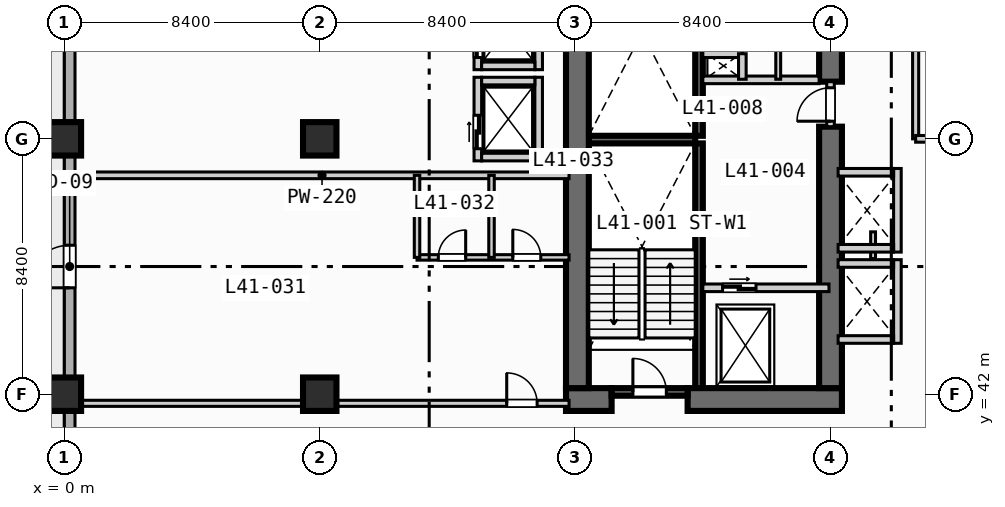
"""IFC4 building model, lengths in metres.
Left out: names, types, materials, properties, quantities, classifications, styles, units other than length and angle.
Written with IfcOpenShell. Run it as: python <this file> out.ifc"""

import sys

from ifc_helpers import new_model, si_unit, direction, frame, frame_2d, origin, origin_2d, place, context, subcontext, project, spatial, rectangle, extrude, element, fill, save


model = new_model("IFC4")
c1 = context("Model", 3, precision=1e-05, world=origin(), true_north=direction((0.0, 1.0)))
c2 = subcontext(c1, "Body", "Model", "MODEL_VIEW")
j1 = project(units=[si_unit("LENGTHUNIT", "METRE"), si_unit("PLANEANGLEUNIT", "RADIAN")], contexts=[c1])
p1 = place(None, origin())
s1 = spatial("IfcSite", under=j1, at=p1, CompositionType="ELEMENT")
p2 = place(p1, origin())
s2 = spatial("IfcBuilding", under=s1, at=p2, CompositionType="ELEMENT")
p3 = place(p2, frame((0.0, 0.0, 171.7)))
s3 = spatial("IfcBuildingStorey", under=s2, at=p3, CompositionType="ELEMENT", Elevation=171.7)
for number, where, z_axis, x_axis in (
    (1, (20.875, 42.2, 0.0), (0.0, 0.0, 1.0), (0.0, 1.0, 0.0)),
    (2, (20.875, 50.5, 0.0), (0.0, 0.0, 1.0), (0.0, 1.0, 0.0)),
):
    element("IfcWall", number, at=place(p3, frame(where, z_axis=z_axis, x_axis=x_axis)), inside=s3, PredefinedType="SOLIDWALL", context=c2, shape_type="SweptSolid", body=[
        extrude(rectangle(XDim=8.05, YDim=0.25, at=frame_2d((4.025, 0.0))), origin(), (0.0, 0.0, 1.0), 3.47),
    ])
p4 = place(p3, frame((17.25, 50.375, 0.0), z_axis=(0.0, 0.0, 1.0), x_axis=(1.0, 0.0, 0.0)))
e3 = element("IfcWall", 3, at=p4, inside=s3, PredefinedType="SOLIDWALL", context=c2, shape_type="SweptSolid", body=[
    extrude(rectangle(XDim=3.5, YDim=0.25, at=frame_2d((1.75, 0.0))), origin(), (0.0, 0.0, 1.0), 3.47),
])
p5 = place(p3, frame((16.5, 41.825, 0.0), z_axis=(0.0, 0.0, 1.0), x_axis=(1.0, 0.0, 0.0)))
e4 = element("IfcWall", 4, at=p5, inside=s3, PredefinedType="SHEAR", context=c2, shape_type="SweptSolid", body=[
    extrude(rectangle(XDim=1.5, YDim=0.75, at=frame_2d((0.75, 0.0))), origin(), (0.0, 0.0, 1.0), 3.47),
])
p6 = place(p3, frame((20.5, 41.825, 0.0), z_axis=(0.0, 0.0, 1.0), x_axis=(1.0, 0.0, 0.0)))
e5 = element("IfcWall", 5, at=p6, inside=s3, PredefinedType="SHEAR", context=c2, shape_type="SweptSolid", body=[
    extrude(rectangle(XDim=5.075, YDim=0.75, at=frame_2d((2.538, 0.0))), origin(), (0.0, 0.0, 1.0), 3.47),
])
p7 = place(p3, frame((16.875, 42.2, 0.0), z_axis=(0.0, 0.0, 1.0), x_axis=(0.0, 1.0, 0.0)))
e6 = element("IfcWall", 6, at=p7, inside=s3, PredefinedType="SHEAR", context=c2, shape_type="SweptSolid", body=[
    extrude(rectangle(XDim=16.35, YDim=0.75, at=frame_2d((8.175, 0.0))), origin(), (0.0, 0.0, 1.0), 3.47),
])
p8 = place(p3, frame((25.2, 42.2, 0.0), z_axis=(0.0, 0.0, 1.0), x_axis=(0.0, 1.0, 0.0)))
e7 = element("IfcWall", 7, at=p8, inside=s3, PredefinedType="SHEAR", context=c2, shape_type="SweptSolid", body=[
    extrude(rectangle(XDim=8.6, YDim=0.75, at=frame_2d((4.3, 0.0))), origin(), (0.0, 0.0, 1.0), 3.47),
])
p9 = place(p3, frame((25.2, 52.28, 0.0), z_axis=(0.0, 0.0, 1.0), x_axis=(0.0, 1.0, 0.0)))
e8 = element("IfcWall", 8, at=p9, inside=s3, PredefinedType="SHEAR", context=c2, shape_type="SweptSolid", body=[
    extrude(rectangle(XDim=1.27, YDim=0.75, at=frame_2d((0.635, 0.0))), origin(), (0.0, 0.0, 1.0), 3.47),
])
for number, where, z_axis, x_axis in (
    (9, (0.0, 42.0, 0.0), (0.0, 0.0, 1.0), (1.0, 0.0, 0.0)),
    (10, (0.0, 50.4, 0.0), (0.0, 0.0, 1.0), (1.0, 0.0, 0.0)),
    (11, (8.4, 42.0, 0.0), (0.0, 0.0, 1.0), (1.0, 0.0, 0.0)),
    (12, (8.4, 50.4, 0.0), (0.0, 0.0, 1.0), (1.0, 0.0, 0.0)),
):
    element("IfcColumn", number, at=place(p3, frame(where, z_axis=z_axis, x_axis=x_axis)), inside=s3, PredefinedType="COLUMN", context=c2, shape_type="SweptSolid", body=[
        extrude(rectangle(XDim=1.1, YDim=1.1, at=origin_2d()), origin(), (0.0, 0.0, 1.0), 3.7),
    ])
p10 = place(p3, frame((0.175, 3.175, 0.0), z_axis=(0.0, 0.0, 1.0), x_axis=(0.0, 1.0, 0.0)))
e13 = element("IfcWall", 13, at=p10, inside=s3, PredefinedType="STANDARD", context=c2, shape_type="SweptSolid", body=[
    extrude(rectangle(XDim=69.25, YDim=0.35, at=frame_2d((34.625, 0.0))), origin(), (0.0, 0.0, 1.0), 3.47),
])
p11 = place(p10, frame((42.325, 0.0, 0.0)))
e14 = element("IfcOpeningElement", 14, at=p11, cuts=e13, PredefinedType="OPENING", context=c2, shape_type="SweptSolid", body=[
    extrude(rectangle(XDim=1.4, YDim=2.2, at=frame_2d((0.7, 1.1))), frame((0.0, 0.185, 0.0), z_axis=(0.0, -1.0, 0.0), x_axis=(1.0, 0.0, 0.0)), (0.0, 0.0, 1.0), 0.37),
])
p12 = place(p10, frame((25.025, 0.0, 0.85)))
e15 = element("IfcOpeningElement", 15, at=p12, cuts=e13, PredefinedType="OPENING", context=c2, shape_type="SweptSolid", body=[
    extrude(rectangle(XDim=2.4, YDim=1.95, at=frame_2d((1.2, 0.975))), frame((0.0, 0.185, 0.0), z_axis=(0.0, -1.0, 0.0), x_axis=(1.0, 0.0, 0.0)), (0.0, 0.0, 1.0), 0.37),
])
p13 = place(p10, frame((33.725, 0.0, 0.85)))
e16 = element("IfcOpeningElement", 16, at=p13, cuts=e13, PredefinedType="OPENING", context=c2, shape_type="SweptSolid", body=[
    extrude(rectangle(XDim=1.8, YDim=1.8, at=frame_2d((0.9, 0.9))), frame((0.0, 0.185, 0.0), z_axis=(0.0, -1.0, 0.0), x_axis=(1.0, 0.0, 0.0)), (0.0, 0.0, 1.0), 0.37),
])
p14 = place(p10, frame((58.625, 0.0, 0.85)))
e17 = element("IfcOpeningElement", 17, at=p14, cuts=e13, PredefinedType="OPENING", context=c2, shape_type="SweptSolid", body=[
    extrude(rectangle(XDim=2.4, YDim=1.95, at=frame_2d((1.2, 0.975))), frame((0.0, 0.185, 0.0), z_axis=(0.0, -1.0, 0.0), x_axis=(1.0, 0.0, 0.0)), (0.0, 0.0, 1.0), 0.37),
])
p15 = place(p3, frame((18.0, 42.075, 0.0), z_axis=(0.0, 0.0, 1.0), x_axis=(1.0, 0.0, 0.0)))
e18 = element("IfcWall", 18, at=p15, inside=s3, PredefinedType="SOLIDWALL", context=c2, shape_type="SweptSolid", body=[
    extrude(rectangle(XDim=2.5, YDim=0.25, at=frame_2d((1.25, 0.0))), origin(), (0.0, 0.0, 1.0), 3.47),
])
p16 = place(p15, frame((0.7, 0.0, 0.0)))
e19 = element("IfcOpeningElement", 19, at=p16, cuts=e18, PredefinedType="OPENING", context=c2, shape_type="SweptSolid", body=[
    extrude(rectangle(XDim=1.1, YDim=2.15, at=frame_2d((0.55, 1.075))), frame((0.0, 0.135, 0.0), z_axis=(0.0, -1.0, 0.0), x_axis=(1.0, 0.0, 0.0)), (0.0, 0.0, 1.0), 0.27),
])
p17 = place(p3, frame((21.0, 45.5, 0.0), z_axis=(0.0, 0.0, 1.0), x_axis=(1.0, 0.0, 0.0)))
e20 = element("IfcWall", 20, at=p17, inside=s3, PredefinedType="SOLIDWALL", context=c2, shape_type="SweptSolid", body=[
    extrude(rectangle(XDim=4.15, YDim=0.25, at=frame_2d((2.075, 0.0))), origin(), (0.0, 0.0, 1.0), 3.47),
])
p18 = place(p17, frame((0.65, 0.0, 0.0)))
e21 = element("IfcOpeningElement", 21, at=p18, cuts=e20, PredefinedType="OPENING", context=c2, shape_type="SweptSolid", body=[
    extrude(rectangle(XDim=1.1, YDim=2.15, at=frame_2d((0.55, 1.075))), frame((0.0, 0.135, 0.0), z_axis=(0.0, -1.0, 0.0), x_axis=(1.0, 0.0, 0.0)), (0.0, 0.0, 1.0), 0.27),
])
p19 = place(p3, frame((25.2, 50.8, 0.0), z_axis=(0.0, 0.0, 1.0), x_axis=(0.0, 1.0, 0.0)))
e22 = element("IfcWall", 22, at=p19, inside=s3, PredefinedType="SOLIDWALL", context=c2, shape_type="SweptSolid", body=[
    extrude(rectangle(XDim=1.48, YDim=0.25, at=frame_2d((0.74, 0.0))), origin(), (0.0, 0.0, 1.0), 3.47),
])
p20 = place(p19, frame((0.18, 0.0, 0.0)))
e23 = element("IfcOpeningElement", 23, at=p20, cuts=e22, PredefinedType="OPENING", context=c2, shape_type="SweptSolid", body=[
    extrude(rectangle(XDim=1.1, YDim=2.15, at=frame_2d((0.55, 1.075))), frame((0.0, 0.135, 0.0), z_axis=(0.0, -1.0, 0.0), x_axis=(1.0, 0.0, 0.0)), (0.0, 0.0, 1.0), 0.27),
])
p21 = place(p3, frame((21.0, 52.34, 0.0), z_axis=(0.0, 0.0, 1.0), x_axis=(1.0, 0.0, 0.0)))
e24 = element("IfcWall", 24, at=p21, inside=s3, PredefinedType="SOLIDWALL", context=c2, shape_type="SweptSolid", body=[
    extrude(rectangle(XDim=3.825, YDim=0.25, at=frame_2d((1.913, 0.0))), origin(), (0.0, 0.0, 1.0), 3.47),
])
p22 = place(p3, frame((21.0, 53.2, 0.0), z_axis=(0.0, 0.0, 1.0), x_axis=(1.0, 0.0, 0.0)))
e25 = element("IfcWall", 25, at=p22, inside=s3, PredefinedType="SOLIDWALL", context=c2, shape_type="SweptSolid", body=[
    extrude(rectangle(XDim=1.3, YDim=0.25, at=frame_2d((0.65, 0.0))), origin(), (0.0, 0.0, 1.0), 3.47),
])
p23 = place(p3, frame((22.3, 52.36, 0.0), z_axis=(0.0, 0.0, 1.0), x_axis=(0.0, 1.0, 0.0)))
e26 = element("IfcWall", 26, at=p23, inside=s3, PredefinedType="SOLIDWALL", context=c2, shape_type="SweptSolid", body=[
    extrude(rectangle(XDim=0.84, YDim=0.25, at=frame_2d((0.42, 0.0))), origin(), (0.0, 0.0, 1.0), 3.47),
])
p24 = place(p3, frame((23.48, 52.36, 0.0), z_axis=(0.0, 0.0, 1.0), x_axis=(0.0, 1.0, 0.0)))
e27 = element("IfcWall", 27, at=p24, inside=s3, PredefinedType="PARTITIONING", context=c2, shape_type="SweptSolid", body=[
    extrude(rectangle(XDim=1.1, YDim=0.16, at=frame_2d((0.55, 0.0))), origin(), (0.0, 0.0, 1.0), 3.47),
])
p25 = place(p3, frame((13.6, 49.675, 0.0), z_axis=(0.0, 0.0, 1.0), x_axis=(0.0, 1.0, 0.0)))
e28 = element("IfcWall", 28, at=p25, inside=s3, PredefinedType="SOLIDWALL", context=c2, shape_type="SweptSolid", body=[
    extrude(rectangle(XDim=2.75, YDim=0.25, at=frame_2d((1.375, 0.0))), origin(), (0.0, 0.0, 1.0), 3.47),
])
p26 = place(p25, frame((0.4, 0.0, 0.0)))
e29 = element("IfcOpeningElement", 29, at=p26, cuts=e28, PredefinedType="OPENING", context=c2, shape_type="SweptSolid", body=[
    extrude(rectangle(XDim=1.1, YDim=2.15, at=frame_2d((0.55, 1.075))), frame((0.0, 0.135, 0.0), z_axis=(0.0, -1.0, 0.0), x_axis=(1.0, 0.0, 0.0)), (0.0, 0.0, 1.0), 0.27),
])
p27 = place(p3, frame((15.6, 49.675, 0.0), z_axis=(0.0, 0.0, 1.0), x_axis=(0.0, 1.0, 0.0)))
e30 = element("IfcWall", 30, at=p27, inside=s3, PredefinedType="SOLIDWALL", context=c2, shape_type="SweptSolid", body=[
    extrude(rectangle(XDim=2.75, YDim=0.25, at=frame_2d((1.375, 0.0))), origin(), (0.0, 0.0, 1.0), 3.47),
])
for number, where, z_axis, x_axis in (
    (31, (13.725, 49.8, 0.0), (0.0, 0.0, 1.0), (1.0, 0.0, 0.0)),
    (32, (13.725, 52.3, 0.0), (0.0, 0.0, 1.0), (1.0, 0.0, 0.0)),
):
    element("IfcWall", number, at=place(p3, frame(where, z_axis=z_axis, x_axis=x_axis)), inside=s3, PredefinedType="SOLIDWALL", context=c2, shape_type="SweptSolid", body=[
        extrude(rectangle(XDim=1.75, YDim=0.25, at=frame_2d((0.875, 0.0))), origin(), (0.0, 0.0, 1.0), 3.47),
    ])
p28 = place(p3, frame((13.6, 52.675, 0.0), z_axis=(0.0, 0.0, 1.0), x_axis=(0.0, 1.0, 0.0)))
e33 = element("IfcWall", 33, at=p28, inside=s3, PredefinedType="SOLIDWALL", context=c2, shape_type="SweptSolid", body=[
    extrude(rectangle(XDim=2.75, YDim=0.25, at=frame_2d((1.375, 0.0))), origin(), (0.0, 0.0, 1.0), 3.47),
])
p29 = place(p28, frame((0.4, 0.0, 0.0)))
e34 = element("IfcOpeningElement", 34, at=p29, cuts=e33, PredefinedType="OPENING", context=c2, shape_type="SweptSolid", body=[
    extrude(rectangle(XDim=1.1, YDim=2.15, at=frame_2d((0.55, 1.075))), frame((0.0, 0.135, 0.0), z_axis=(0.0, -1.0, 0.0), x_axis=(1.0, 0.0, 0.0)), (0.0, 0.0, 1.0), 0.27),
])
p30 = place(p3, frame((15.6, 52.675, 0.0), z_axis=(0.0, 0.0, 1.0), x_axis=(0.0, 1.0, 0.0)))
e35 = element("IfcWall", 35, at=p30, inside=s3, PredefinedType="SOLIDWALL", context=c2, shape_type="SweptSolid", body=[
    extrude(rectangle(XDim=2.75, YDim=0.25, at=frame_2d((1.375, 0.0))), origin(), (0.0, 0.0, 1.0), 3.47),
])
p31 = place(p3, frame((13.725, 52.8, 0.0), z_axis=(0.0, 0.0, 1.0), x_axis=(1.0, 0.0, 0.0)))
e36 = element("IfcWall", 36, at=p31, inside=s3, PredefinedType="SOLIDWALL", context=c2, shape_type="SweptSolid", body=[
    extrude(rectangle(XDim=1.75, YDim=0.25, at=frame_2d((0.875, 0.0))), origin(), (0.0, 0.0, 1.0), 3.47),
])
p32 = place(p3, frame((27.4, 43.675, 0.0), z_axis=(0.0, 0.0, 1.0), x_axis=(0.0, 1.0, 0.0)))
e37 = element("IfcWall", 37, at=p32, inside=s3, PredefinedType="SOLIDWALL", context=c2, shape_type="SweptSolid", body=[
    extrude(rectangle(XDim=2.75, YDim=0.25, at=frame_2d((1.375, 0.0))), origin(), (0.0, 0.0, 1.0), 3.47),
])
for number, where, z_axis, x_axis in (
    (38, (25.45, 43.8, 0.0), (0.0, 0.0, 1.0), (1.0, 0.0, 0.0)),
    (39, (25.45, 46.3, 0.0), (0.0, 0.0, 1.0), (1.0, 0.0, 0.0)),
):
    element("IfcWall", number, at=place(p3, frame(where, z_axis=z_axis, x_axis=x_axis)), inside=s3, PredefinedType="SOLIDWALL", context=c2, shape_type="SweptSolid", body=[
        extrude(rectangle(XDim=1.825, YDim=0.25, at=frame_2d((0.913, 0.0))), origin(), (0.0, 0.0, 1.0), 3.47),
    ])
p33 = place(p3, frame((26.6, 46.46, 0.0), z_axis=(0.0, 0.0, 1.0), x_axis=(0.0, 1.0, 0.0)))
e40 = element("IfcWall", 40, at=p33, inside=s3, PredefinedType="PARTITIONING", context=c2, shape_type="SweptSolid", body=[
    extrude(rectangle(XDim=0.88, YDim=0.16, at=frame_2d((0.44, 0.0))), origin(), (0.0, 0.0, 1.0), 3.47),
])
p34 = place(p3, frame((27.4, 46.675, 0.0), z_axis=(0.0, 0.0, 1.0), x_axis=(0.0, 1.0, 0.0)))
e41 = element("IfcWall", 41, at=p34, inside=s3, PredefinedType="SOLIDWALL", context=c2, shape_type="SweptSolid", body=[
    extrude(rectangle(XDim=2.75, YDim=0.25, at=frame_2d((1.375, 0.0))), origin(), (0.0, 0.0, 1.0), 3.47),
])
for number, where, z_axis, x_axis in (
    (42, (25.45, 46.8, 0.0), (0.0, 0.0, 1.0), (1.0, 0.0, 0.0)),
    (43, (25.45, 49.3, 0.0), (0.0, 0.0, 1.0), (1.0, 0.0, 0.0)),
):
    element("IfcWall", number, at=place(p3, frame(where, z_axis=z_axis, x_axis=x_axis)), inside=s3, PredefinedType="SOLIDWALL", context=c2, shape_type="SweptSolid", body=[
        extrude(rectangle(XDim=1.825, YDim=0.25, at=frame_2d((0.913, 0.0))), origin(), (0.0, 0.0, 1.0), 3.47),
    ])
p35 = place(p3, frame((0.35, 41.7, 0.0), z_axis=(0.0, 0.0, 1.0), x_axis=(1.0, 0.0, 0.0)))
e44 = element("IfcWall", 44, at=p35, inside=s3, PredefinedType="PARTITIONING", context=c2, shape_type="SweptSolid", body=[
    extrude(rectangle(XDim=16.25, YDim=0.2, at=frame_2d((8.125, 0.0))), origin(), (0.0, 0.0, 1.0), 2.82),
])
p36 = place(p35, frame((14.2, 0.0, 0.0)))
e45 = element("IfcOpeningElement", 45, at=p36, cuts=e44, PredefinedType="OPENING", context=c2, shape_type="SweptSolid", body=[
    extrude(rectangle(XDim=1.0, YDim=2.15, at=frame_2d((0.5, 1.075))), frame((0.0, 0.11, 0.0), z_axis=(0.0, -1.0, 0.0), x_axis=(1.0, 0.0, 0.0)), (0.0, 0.0, 1.0), 0.22),
])
p37 = place(p3, frame((0.35, 49.2, 0.0), z_axis=(0.0, 0.0, 1.0), x_axis=(1.0, 0.0, 0.0)))
e46 = element("IfcWall", 46, at=p37, inside=s3, PredefinedType="PARTITIONING", context=c2, shape_type="SweptSolid", body=[
    extrude(rectangle(XDim=16.25, YDim=0.22, at=frame_2d((8.125, 0.0))), origin(), (0.0, 0.0, 1.0), 3.47),
])
p38 = place(p3, frame((11.6, 46.5, 0.0), z_axis=(0.0, 0.0, 1.0), x_axis=(1.0, 0.0, 0.0)))
e47 = element("IfcWall", 47, at=p38, inside=s3, PredefinedType="PLUMBINGWALL", context=c2, shape_type="SweptSolid", body=[
    extrude(rectangle(XDim=5.0, YDim=0.18, at=frame_2d((2.5, 0.0))), origin(), (0.0, 0.0, 1.0), 3.47),
])
p39 = place(p38, frame((0.7, 0.0, 0.0)))
e48 = element("IfcOpeningElement", 48, at=p39, cuts=e47, PredefinedType="OPENING", context=c2, shape_type="SweptSolid", body=[
    extrude(rectangle(XDim=0.9, YDim=2.1, at=frame_2d((0.45, 1.05))), frame((0.0, 0.1, 0.0), z_axis=(0.0, -1.0, 0.0), x_axis=(1.0, 0.0, 0.0)), (0.0, 0.0, 1.0), 0.2),
])
p40 = place(p38, frame((3.15, 0.0, 0.0)))
e49 = element("IfcOpeningElement", 49, at=p40, cuts=e47, PredefinedType="OPENING", context=c2, shape_type="SweptSolid", body=[
    extrude(rectangle(XDim=0.92, YDim=2.1, at=frame_2d((0.46, 1.05))), frame((0.0, 0.1, 0.0), z_axis=(0.0, -1.0, 0.0), x_axis=(1.0, 0.0, 0.0)), (0.0, 0.0, 1.0), 0.2),
])
for number, where, z_axis, x_axis in (
    (50, (11.6, 46.5, 0.0), (0.0, 0.0, 1.0), (0.0, 1.0, 0.0)),
    (51, (14.05, 46.5, 0.0), (0.0, 0.0, 1.0), (0.0, 1.0, 0.0)),
):
    element("IfcWall", number, at=place(p3, frame(where, z_axis=z_axis, x_axis=x_axis)), inside=s3, PredefinedType="PLUMBINGWALL", context=c2, shape_type="SweptSolid", body=[
        extrude(rectangle(XDim=2.7, YDim=0.18, at=frame_2d((1.35, 0.0))), origin(), (0.0, 0.0, 1.0), 3.47),
    ])
p41 = place(p3, frame((28.0, 50.4, 0.0), z_axis=(0.0, 0.0, 1.0), x_axis=(0.0, 1.0, 0.0)))
e52 = element("IfcWall", 52, at=p41, inside=s3, PredefinedType="PARTITIONING", context=c2, shape_type="SweptSolid", body=[
    extrude(rectangle(XDim=21.8, YDim=0.2, at=frame_2d((10.9, 0.0))), origin(), (0.0, 0.0, 1.0), 3.47),
])
p42 = place(p41, frame((4.0, 0.0, 0.0)))
e53 = element("IfcOpeningElement", 53, at=p42, cuts=e52, PredefinedType="OPENING", context=c2, shape_type="SweptSolid", body=[
    extrude(rectangle(XDim=0.92, YDim=2.1, at=frame_2d((0.46, 1.05))), frame((0.0, 0.11, 0.0), z_axis=(0.0, -1.0, 0.0), x_axis=(1.0, 0.0, 0.0)), (0.0, 0.0, 1.0), 0.22),
])
p43 = place(p3, frame((28.0, 50.4, 0.0), z_axis=(0.0, 0.0, 1.0), x_axis=(1.0, 0.0, 0.0)))
e54 = element("IfcWall", 54, at=p43, inside=s3, PredefinedType="PARTITIONING", context=c2, shape_type="SweptSolid", body=[
    extrude(rectangle(XDim=5.3, YDim=0.22, at=frame_2d((2.65, 0.0))), origin(), (0.0, 0.0, 1.0), 2.82),
])
p44 = place(p11, origin())
e55 = element("IfcDoor", 55, at=p44, inside=s3, OperationType="SINGLE_SWING_LEFT", PredefinedType="DOOR", context=c2, shape_type="SweptSolid", body=[
    extrude(rectangle(XDim=1.4, YDim=2.2, at=frame_2d((0.7, 1.1))), frame((0.0, 0.025, 0.0), z_axis=(0.0, -1.0, 0.0), x_axis=(1.0, 0.0, 0.0)), (0.0, 0.0, 1.0), 0.05),
])
fill(e14, e55)
p45 = place(p16, origin())
e56 = element("IfcDoor", 56, at=p45, inside=s3, OperationType="SINGLE_SWING_LEFT", PredefinedType="DOOR", context=c2, shape_type="SweptSolid", body=[
    extrude(rectangle(XDim=1.1, YDim=2.15, at=frame_2d((0.55, 1.075))), frame((0.0, 0.025, 0.0), z_axis=(0.0, -1.0, 0.0), x_axis=(1.0, 0.0, 0.0)), (0.0, 0.0, 1.0), 0.05),
])
fill(e19, e56)
p46 = place(p18, origin())
e57 = element("IfcDoor", 57, at=p46, inside=s3, OperationType="SLIDING_TO_LEFT", PredefinedType="DOOR", context=c2, shape_type="SweptSolid", body=[
    extrude(rectangle(XDim=1.1, YDim=2.15, at=frame_2d((0.55, 1.075))), frame((0.0, 0.025, 0.0), z_axis=(0.0, -1.0, 0.0), x_axis=(1.0, 0.0, 0.0)), (0.0, 0.0, 1.0), 0.05),
])
fill(e21, e57)
p47 = place(p20, origin())
e58 = element("IfcDoor", 58, at=p47, inside=s3, OperationType="SINGLE_SWING_LEFT", PredefinedType="DOOR", context=c2, shape_type="SweptSolid", body=[
    extrude(rectangle(XDim=1.1, YDim=2.15, at=frame_2d((0.55, 1.075))), frame((0.0, 0.025, 0.0), z_axis=(0.0, -1.0, 0.0), x_axis=(1.0, 0.0, 0.0)), (0.0, 0.0, 1.0), 0.05),
])
fill(e23, e58)
p48 = place(p26, origin())
e59 = element("IfcDoor", 59, at=p48, inside=s3, OperationType="SLIDING_TO_LEFT", PredefinedType="DOOR", context=c2, shape_type="SweptSolid", body=[
    extrude(rectangle(XDim=1.1, YDim=2.15, at=frame_2d((0.55, 1.075))), frame((0.0, 0.025, 0.0), z_axis=(0.0, -1.0, 0.0), x_axis=(1.0, 0.0, 0.0)), (0.0, 0.0, 1.0), 0.05),
])
fill(e29, e59)
p49 = place(p29, origin())
e60 = element("IfcDoor", 60, at=p49, inside=s3, OperationType="SLIDING_TO_LEFT", PredefinedType="DOOR", context=c2, shape_type="SweptSolid", body=[
    extrude(rectangle(XDim=1.1, YDim=2.15, at=frame_2d((0.55, 1.075))), frame((0.0, 0.025, 0.0), z_axis=(0.0, -1.0, 0.0), x_axis=(1.0, 0.0, 0.0)), (0.0, 0.0, 1.0), 0.05),
])
fill(e34, e60)
p50 = place(p36, origin())
e61 = element("IfcDoor", 61, at=p50, inside=s3, OperationType="SINGLE_SWING_LEFT", PredefinedType="DOOR", context=c2, shape_type="SweptSolid", body=[
    extrude(rectangle(XDim=1.0, YDim=2.15, at=frame_2d((0.5, 1.075))), frame((0.0, 0.025, 0.0), z_axis=(0.0, -1.0, 0.0), x_axis=(1.0, 0.0, 0.0)), (0.0, 0.0, 1.0), 0.05),
])
fill(e45, e61)
p51 = place(p39, origin())
e62 = element("IfcDoor", 62, at=p51, inside=s3, OperationType="SINGLE_SWING_RIGHT", PredefinedType="DOOR", context=c2, shape_type="SweptSolid", body=[
    extrude(rectangle(XDim=0.9, YDim=2.1, at=frame_2d((0.45, 1.05))), frame((0.0, 0.025, 0.0), z_axis=(0.0, -1.0, 0.0), x_axis=(1.0, 0.0, 0.0)), (0.0, 0.0, 1.0), 0.05),
])
fill(e48, e62)
p52 = place(p40, origin())
e63 = element("IfcDoor", 63, at=p52, inside=s3, OperationType="SINGLE_SWING_LEFT", PredefinedType="DOOR", context=c2, shape_type="SweptSolid", body=[
    extrude(rectangle(XDim=0.92, YDim=2.1, at=frame_2d((0.46, 1.05))), frame((0.0, 0.025, 0.0), z_axis=(0.0, -1.0, 0.0), x_axis=(1.0, 0.0, 0.0)), (0.0, 0.0, 1.0), 0.05),
])
fill(e49, e63)
save(model, sys.argv[1])
